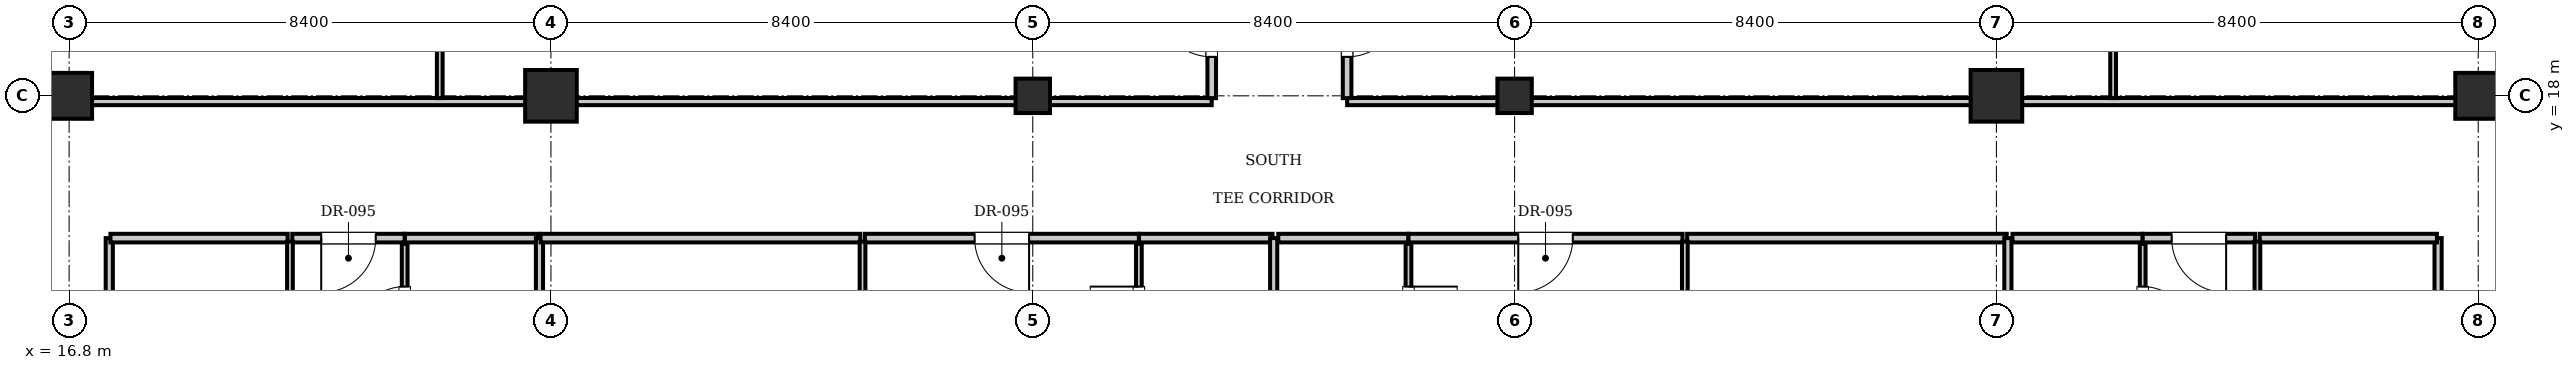
"""IFC4 building model, lengths in metres.
Left out: names, types, materials, properties, quantities, classifications, styles, units other than length and angle.
Written with IfcOpenShell. Run it as: python <this file> out.ifc"""

import sys

from ifc_helpers import new_model, si_unit, direction, frame, frame_2d, origin, origin_2d, place, context, subcontext, project, spatial, rectangle, i_section, extrude, element, fill, save


model = new_model("IFC4")
c1 = context("Model", 3, precision=1e-05, world=origin(), true_north=direction((0.0, 1.0)))
c2 = subcontext(c1, "Body", "Model", "MODEL_VIEW")
j1 = project(units=[si_unit("LENGTHUNIT", "METRE"), si_unit("PLANEANGLEUNIT", "RADIAN")], contexts=[c1])
p1 = place(None, origin())
s1 = spatial("IfcSite", under=j1, at=p1, CompositionType="ELEMENT")
p2 = place(p1, origin())
s2 = spatial("IfcBuilding", under=s1, at=p2, CompositionType="ELEMENT")
p3 = place(p2, frame((0.0, 0.0, 215.95)))
s3 = spatial("IfcBuildingStorey", under=s2, at=p3, CompositionType="ELEMENT", Elevation=215.95)
for number, where, z_axis, x_axis in (
    (1, (25.2, 18.0, 0.0), (0.0, 0.0, 1.0), (1.0, 0.0, 0.0)),
    (2, (50.4, 18.0, 0.0), (0.0, 0.0, 1.0), (1.0, 0.0, 0.0)),
):
    element("IfcColumn", number, at=place(p3, frame(where, z_axis=z_axis, x_axis=x_axis)), inside=s3, PredefinedType="COLUMN", context=c2, shape_type="SweptSolid", body=[
        extrude(rectangle(XDim=0.9, YDim=0.9, at=origin_2d()), origin(), (0.0, 0.0, 1.0), 3.85),
    ])
for number, where, z_axis, x_axis in (
    (3, (33.6, 18.0, 0.0), (0.0, 0.0, 1.0), (1.0, 0.0, 0.0)),
    (4, (42.0, 18.0, 0.0), (0.0, 0.0, 1.0), (1.0, 0.0, 0.0)),
):
    element("IfcColumn", number, at=place(p3, frame(where, z_axis=z_axis, x_axis=x_axis)), inside=s3, PredefinedType="COLUMN", context=c2, shape_type="SweptSolid", body=[
        extrude(i_section(OverallWidth=0.6, OverallDepth=0.6, WebThickness=0.025, FlangeThickness=0.038, at=origin_2d()), origin(), (0.0, 0.0, 1.0), 3.85),
    ])
for number, where, z_axis, x_axis in (
    (5, (16.8, 18.0, 0.0), (0.0, 0.0, 1.0), (1.0, 0.0, 0.0)),
    (6, (58.8, 18.0, 0.0), (0.0, 0.0, 1.0), (1.0, 0.0, 0.0)),
):
    element("IfcColumn", number, at=place(p3, frame(where, z_axis=z_axis, x_axis=x_axis)), inside=s3, PredefinedType="COLUMN", context=c2, shape_type="SweptSolid", body=[
        extrude(rectangle(XDim=0.8, YDim=0.8, at=origin_2d()), origin(), (0.0, 0.0, 1.0), 3.85),
    ])
for number, where, z_axis, x_axis in (
    (7, (17.5, 9.0, 0.0), (0.0, 0.0, 1.0), (0.0, 1.0, 0.0)),
    (8, (58.1, 9.0, 0.0), (0.0, 0.0, 1.0), (0.0, 1.0, 0.0)),
):
    element("IfcWall", number, at=place(p3, frame(where, z_axis=z_axis, x_axis=x_axis)), inside=s3, PredefinedType="PARTITIONING", context=c2, shape_type="SweptSolid", body=[
        extrude(rectangle(XDim=6.52, YDim=0.125, at=frame_2d((3.26, 0.0))), origin(), (0.0, 0.0, 1.0), 3.61),
    ])
p4 = place(p3, frame((22.65, 15.52, 0.0), z_axis=(0.0, 0.0, 1.0), x_axis=(1.0, 0.0, 0.0)))
e9 = element("IfcWall", 9, at=p4, inside=s3, PredefinedType="PARTITIONING", context=c2, shape_type="SweptSolid", body=[
    extrude(rectangle(XDim=2.33, YDim=0.15, at=frame_2d((1.165, 0.0))), origin(), (0.0, 0.0, 1.0), 3.61),
])
p5 = place(p3, frame((22.65, 13.08, 0.0), z_axis=(0.0, 0.0, 1.0), x_axis=(0.0, 1.0, 0.0)))
e10 = element("IfcWall", 10, at=p5, inside=s3, PredefinedType="PARTITIONING", context=c2, shape_type="SweptSolid", body=[
    extrude(rectangle(XDim=2.34, YDim=0.1, at=frame_2d((1.17, 0.0))), origin(), (0.0, 0.0, 1.0), 3.61),
])
p6 = place(p5, frame((0.745, 0.0, 0.0)))
e11 = element("IfcOpeningElement", 11, at=p6, cuts=e10, PredefinedType="OPENING", context=c2, shape_type="SweptSolid", body=[
    extrude(rectangle(XDim=0.85, YDim=2.1, at=frame_2d((0.425, 1.05))), frame((0.0, 0.06, 0.0), z_axis=(0.0, -1.0, 0.0), x_axis=(1.0, 0.0, 0.0)), (0.0, 0.0, 1.0), 0.12),
])
p7 = place(p3, frame((17.52, 15.52, 0.0), z_axis=(0.0, 0.0, 1.0), x_axis=(1.0, 0.0, 0.0)))
e12 = element("IfcWall", 12, at=p7, inside=s3, PredefinedType="PARTITIONING", context=c2, shape_type="SweptSolid", body=[
    extrude(rectangle(XDim=3.09, YDim=0.15, at=frame_2d((1.545, 0.0))), origin(), (0.0, 0.0, 1.0), 3.61),
])
p8 = place(p3, frame((20.69, 15.52, 0.0), z_axis=(0.0, 0.0, 1.0), x_axis=(1.0, 0.0, 0.0)))
e13 = element("IfcWall", 13, at=p8, inside=s3, PredefinedType="PARTITIONING", context=c2, shape_type="SweptSolid", body=[
    extrude(rectangle(XDim=1.96, YDim=0.15, at=frame_2d((0.98, 0.0))), origin(), (0.0, 0.0, 1.0), 3.61),
])
p9 = place(p8, frame((0.505, 0.0, 0.0)))
e14 = element("IfcOpeningElement", 14, at=p9, cuts=e13, PredefinedType="OPENING", context=c2, shape_type="SweptSolid", body=[
    extrude(rectangle(XDim=0.95, YDim=2.15, at=frame_2d((0.475, 1.075))), frame((0.0, 0.085, 0.0), z_axis=(0.0, -1.0, 0.0), x_axis=(1.0, 0.0, 0.0)), (0.0, 0.0, 1.0), 0.17),
])
p10 = place(p3, frame((20.65, 4.63, 0.0), z_axis=(0.0, 0.0, 1.0), x_axis=(0.0, 1.0, 0.0)))
e15 = element("IfcWall", 15, at=p10, inside=s3, PredefinedType="PARTITIONING", context=c2, shape_type="SweptSolid", body=[
    extrude(rectangle(XDim=10.83, YDim=0.1, at=frame_2d((5.415, 0.0))), origin(), (0.0, 0.0, 1.0), 3.61),
])
p11 = place(p10, frame((1.6, 0.0, 0.0)))
e16 = element("IfcOpeningElement", 16, at=p11, cuts=e15, PredefinedType="OPENING", context=c2, shape_type="SweptSolid", body=[
    extrude(rectangle(XDim=0.9, YDim=2.1, at=frame_2d((0.45, 1.05))), frame((0.0, 0.06, 0.0), z_axis=(0.0, -1.0, 0.0), x_axis=(1.0, 0.0, 0.0)), (0.0, 0.0, 1.0), 0.12),
])
p12 = place(p3, frame((25.0, 4.7, 0.0), z_axis=(0.0, 0.0, 1.0), x_axis=(0.0, 1.0, 0.0)))
e17 = element("IfcWall", 17, at=p12, inside=s3, PredefinedType="PARTITIONING", context=c2, shape_type="SweptSolid", body=[
    extrude(rectangle(XDim=10.82, YDim=0.125, at=frame_2d((5.41, 0.0))), origin(), (0.0, 0.0, 1.0), 3.61),
])
p13 = place(p3, frame((35.45, 15.52, 0.0), z_axis=(0.0, 0.0, 1.0), x_axis=(1.0, 0.0, 0.0)))
e18 = element("IfcWall", 18, at=p13, inside=s3, PredefinedType="PARTITIONING", context=c2, shape_type="SweptSolid", body=[
    extrude(rectangle(XDim=2.33, YDim=0.15, at=frame_2d((1.165, 0.0))), origin(), (0.0, 0.0, 1.0), 3.61),
])
p14 = place(p3, frame((35.45, 13.08, 0.0), z_axis=(0.0, 0.0, 1.0), x_axis=(0.0, 1.0, 0.0)))
e19 = element("IfcWall", 19, at=p14, inside=s3, PredefinedType="PARTITIONING", context=c2, shape_type="SweptSolid", body=[
    extrude(rectangle(XDim=2.34, YDim=0.1, at=frame_2d((1.17, 0.0))), origin(), (0.0, 0.0, 1.0), 3.61),
])
p15 = place(p14, frame((0.745, 0.0, 0.0)))
e20 = element("IfcOpeningElement", 20, at=p15, cuts=e19, PredefinedType="OPENING", context=c2, shape_type="SweptSolid", body=[
    extrude(rectangle(XDim=0.85, YDim=2.1, at=frame_2d((0.425, 1.05))), frame((0.0, 0.06, 0.0), z_axis=(0.0, -1.0, 0.0), x_axis=(1.0, 0.0, 0.0)), (0.0, 0.0, 1.0), 0.12),
])
p16 = place(p3, frame((25.02, 15.52, 0.0), z_axis=(0.0, 0.0, 1.0), x_axis=(1.0, 0.0, 0.0)))
e21 = element("IfcWall", 21, at=p16, inside=s3, PredefinedType="PARTITIONING", context=c2, shape_type="SweptSolid", body=[
    extrude(rectangle(XDim=5.572, YDim=0.15, at=frame_2d((2.786, 0.0))), origin(), (0.0, 0.0, 1.0), 3.61),
])
p17 = place(p3, frame((30.672, 15.52, 0.0), z_axis=(0.0, 0.0, 1.0), x_axis=(1.0, 0.0, 0.0)))
e22 = element("IfcWall", 22, at=p17, inside=s3, PredefinedType="PARTITIONING", context=c2, shape_type="SweptSolid", body=[
    extrude(rectangle(XDim=4.778, YDim=0.15, at=frame_2d((2.389, 0.0))), origin(), (0.0, 0.0, 1.0), 3.61),
])
p18 = place(p17, frame((1.914, 0.0, 0.0)))
e23 = element("IfcOpeningElement", 23, at=p18, cuts=e22, PredefinedType="OPENING", context=c2, shape_type="SweptSolid", body=[
    extrude(rectangle(XDim=0.95, YDim=2.15, at=frame_2d((0.475, 1.075))), frame((0.0, 0.085, 0.0), z_axis=(0.0, -1.0, 0.0), x_axis=(1.0, 0.0, 0.0)), (0.0, 0.0, 1.0), 0.17),
])
p19 = place(p3, frame((30.632, 4.63, 0.0), z_axis=(0.0, 0.0, 1.0), x_axis=(0.0, 1.0, 0.0)))
e24 = element("IfcWall", 24, at=p19, inside=s3, PredefinedType="PARTITIONING", context=c2, shape_type="SweptSolid", body=[
    extrude(rectangle(XDim=10.83, YDim=0.1, at=frame_2d((5.415, 0.0))), origin(), (0.0, 0.0, 1.0), 3.61),
])
p20 = place(p19, frame((1.6, 0.0, 0.0)))
e25 = element("IfcOpeningElement", 25, at=p20, cuts=e24, PredefinedType="OPENING", context=c2, shape_type="SweptSolid", body=[
    extrude(rectangle(XDim=0.9, YDim=2.1, at=frame_2d((0.45, 1.05))), frame((0.0, 0.06, 0.0), z_axis=(0.0, -1.0, 0.0), x_axis=(1.0, 0.0, 0.0)), (0.0, 0.0, 1.0), 0.12),
])
p21 = place(p3, frame((37.8, 4.7, 0.0), z_axis=(0.0, 0.0, 1.0), x_axis=(0.0, 1.0, 0.0)))
e26 = element("IfcWall", 26, at=p21, inside=s3, PredefinedType="PARTITIONING", context=c2, shape_type="SweptSolid", body=[
    extrude(rectangle(XDim=10.82, YDim=0.125, at=frame_2d((5.41, 0.0))), origin(), (0.0, 0.0, 1.0), 3.255),
])
p22 = place(p3, frame((37.88, 15.52, 0.0), z_axis=(0.0, 0.0, 1.0), x_axis=(1.0, 0.0, 0.0)))
e27 = element("IfcWall", 27, at=p22, inside=s3, PredefinedType="PARTITIONING", context=c2, shape_type="SweptSolid", body=[
    extrude(rectangle(XDim=2.27, YDim=0.15, at=frame_2d((1.135, 0.0))), origin(), (0.0, 0.0, 1.0), 3.61),
])
p23 = place(p3, frame((40.15, 13.08, 0.0), z_axis=(0.0, 0.0, 1.0), x_axis=(0.0, 1.0, 0.0)))
e28 = element("IfcWall", 28, at=p23, inside=s3, PredefinedType="PARTITIONING", context=c2, shape_type="SweptSolid", body=[
    extrude(rectangle(XDim=2.34, YDim=0.1, at=frame_2d((1.17, 0.0))), origin(), (0.0, 0.0, 1.0), 3.61),
])
p24 = place(p23, frame((0.745, 0.0, 0.0)))
e29 = element("IfcOpeningElement", 29, at=p24, cuts=e28, PredefinedType="OPENING", context=c2, shape_type="SweptSolid", body=[
    extrude(rectangle(XDim=0.85, YDim=2.1, at=frame_2d((0.425, 1.05))), frame((0.0, 0.06, 0.0), z_axis=(0.0, -1.0, 0.0), x_axis=(1.0, 0.0, 0.0)), (0.0, 0.0, 1.0), 0.12),
])
p25 = place(p3, frame((40.15, 15.52, 0.0), z_axis=(0.0, 0.0, 1.0), x_axis=(1.0, 0.0, 0.0)))
e30 = element("IfcWall", 30, at=p25, inside=s3, PredefinedType="PARTITIONING", context=c2, shape_type="SweptSolid", body=[
    extrude(rectangle(XDim=4.778, YDim=0.15, at=frame_2d((2.389, 0.0))), origin(), (0.0, 0.0, 1.0), 3.61),
])
p26 = place(p25, frame((1.914, 0.0, 0.0)))
e31 = element("IfcOpeningElement", 31, at=p26, cuts=e30, PredefinedType="OPENING", context=c2, shape_type="SweptSolid", body=[
    extrude(rectangle(XDim=0.95, YDim=2.15, at=frame_2d((0.475, 1.075))), frame((0.0, 0.085, 0.0), z_axis=(0.0, -1.0, 0.0), x_axis=(1.0, 0.0, 0.0)), (0.0, 0.0, 1.0), 0.17),
])
p27 = place(p3, frame((45.008, 15.52, 0.0), z_axis=(0.0, 0.0, 1.0), x_axis=(1.0, 0.0, 0.0)))
e32 = element("IfcWall", 32, at=p27, inside=s3, PredefinedType="PARTITIONING", context=c2, shape_type="SweptSolid", body=[
    extrude(rectangle(XDim=5.572, YDim=0.15, at=frame_2d((2.786, 0.0))), origin(), (0.0, 0.0, 1.0), 3.61),
])
p28 = place(p3, frame((44.968, 4.63, 0.0), z_axis=(0.0, 0.0, 1.0), x_axis=(0.0, 1.0, 0.0)))
e33 = element("IfcWall", 33, at=p28, inside=s3, PredefinedType="PARTITIONING", context=c2, shape_type="SweptSolid", body=[
    extrude(rectangle(XDim=10.83, YDim=0.1, at=frame_2d((5.415, 0.0))), origin(), (0.0, 0.0, 1.0), 3.61),
])
p29 = place(p28, frame((1.6, 0.0, 0.0)))
e34 = element("IfcOpeningElement", 34, at=p29, cuts=e33, PredefinedType="OPENING", context=c2, shape_type="SweptSolid", body=[
    extrude(rectangle(XDim=0.9, YDim=2.1, at=frame_2d((0.45, 1.05))), frame((0.0, 0.06, 0.0), z_axis=(0.0, -1.0, 0.0), x_axis=(1.0, 0.0, 0.0)), (0.0, 0.0, 1.0), 0.12),
])
p30 = place(p3, frame((50.6, 4.7, 0.0), z_axis=(0.0, 0.0, 1.0), x_axis=(0.0, 1.0, 0.0)))
e35 = element("IfcWall", 35, at=p30, inside=s3, PredefinedType="PARTITIONING", context=c2, shape_type="SweptSolid", body=[
    extrude(rectangle(XDim=10.82, YDim=0.125, at=frame_2d((5.41, 0.0))), origin(), (0.0, 0.0, 1.0), 3.61),
])
p31 = place(p3, frame((50.68, 15.52, 0.0), z_axis=(0.0, 0.0, 1.0), x_axis=(1.0, 0.0, 0.0)))
e36 = element("IfcWall", 36, at=p31, inside=s3, PredefinedType="PARTITIONING", context=c2, shape_type="SweptSolid", body=[
    extrude(rectangle(XDim=2.27, YDim=0.15, at=frame_2d((1.135, 0.0))), origin(), (0.0, 0.0, 1.0), 3.61),
])
p32 = place(p3, frame((52.95, 13.08, 0.0), z_axis=(0.0, 0.0, 1.0), x_axis=(0.0, 1.0, 0.0)))
e37 = element("IfcWall", 37, at=p32, inside=s3, PredefinedType="PARTITIONING", context=c2, shape_type="SweptSolid", body=[
    extrude(rectangle(XDim=2.34, YDim=0.1, at=frame_2d((1.17, 0.0))), origin(), (0.0, 0.0, 1.0), 3.61),
])
p33 = place(p32, frame((0.745, 0.0, 0.0)))
e38 = element("IfcOpeningElement", 38, at=p33, cuts=e37, PredefinedType="OPENING", context=c2, shape_type="SweptSolid", body=[
    extrude(rectangle(XDim=0.85, YDim=2.1, at=frame_2d((0.425, 1.05))), frame((0.0, 0.06, 0.0), z_axis=(0.0, -1.0, 0.0), x_axis=(1.0, 0.0, 0.0)), (0.0, 0.0, 1.0), 0.12),
])
p34 = place(p3, frame((52.95, 15.52, 0.0), z_axis=(0.0, 0.0, 1.0), x_axis=(1.0, 0.0, 0.0)))
e39 = element("IfcWall", 39, at=p34, inside=s3, PredefinedType="PARTITIONING", context=c2, shape_type="SweptSolid", body=[
    extrude(rectangle(XDim=1.96, YDim=0.15, at=frame_2d((0.98, 0.0))), origin(), (0.0, 0.0, 1.0), 3.61),
])
p35 = place(p34, frame((0.505, 0.0, 0.0)))
e40 = element("IfcOpeningElement", 40, at=p35, cuts=e39, PredefinedType="OPENING", context=c2, shape_type="SweptSolid", body=[
    extrude(rectangle(XDim=0.95, YDim=2.15, at=frame_2d((0.475, 1.075))), frame((0.0, 0.085, 0.0), z_axis=(0.0, -1.0, 0.0), x_axis=(1.0, 0.0, 0.0)), (0.0, 0.0, 1.0), 0.17),
])
p36 = place(p3, frame((54.99, 15.52, 0.0), z_axis=(0.0, 0.0, 1.0), x_axis=(1.0, 0.0, 0.0)))
e41 = element("IfcWall", 41, at=p36, inside=s3, PredefinedType="PARTITIONING", context=c2, shape_type="SweptSolid", body=[
    extrude(rectangle(XDim=3.09, YDim=0.15, at=frame_2d((1.545, 0.0))), origin(), (0.0, 0.0, 1.0), 3.61),
])
p37 = place(p3, frame((54.95, 4.63, 0.0), z_axis=(0.0, 0.0, 1.0), x_axis=(0.0, 1.0, 0.0)))
e42 = element("IfcWall", 42, at=p37, inside=s3, PredefinedType="PARTITIONING", context=c2, shape_type="SweptSolid", body=[
    extrude(rectangle(XDim=10.83, YDim=0.1, at=frame_2d((5.415, 0.0))), origin(), (0.0, 0.0, 1.0), 3.61),
])
p38 = place(p37, frame((1.6, 0.0, 0.0)))
e43 = element("IfcOpeningElement", 43, at=p38, cuts=e42, PredefinedType="OPENING", context=c2, shape_type="SweptSolid", body=[
    extrude(rectangle(XDim=0.9, YDim=2.1, at=frame_2d((0.45, 1.05))), frame((0.0, 0.06, 0.0), z_axis=(0.0, -1.0, 0.0), x_axis=(1.0, 0.0, 0.0)), (0.0, 0.0, 1.0), 0.12),
])
p39 = place(p3, frame((13.2, 17.9, 0.0), z_axis=(0.0, 0.0, 1.0), x_axis=(1.0, 0.0, 0.0)))
e44 = element("IfcWall", 44, at=p39, inside=s3, PredefinedType="PARTITIONING", context=c2, shape_type="SweptSolid", body=[
    extrude(rectangle(XDim=23.52, YDim=0.125, at=frame_2d((11.76, 0.0))), origin(), (0.0, 0.0, 1.0), 3.071),
])
p40 = place(p3, frame((39.08, 17.9, 0.0), z_axis=(0.0, 0.0, 1.0), x_axis=(1.0, 0.0, 0.0)))
e45 = element("IfcWall", 45, at=p40, inside=s3, PredefinedType="PARTITIONING", context=c2, shape_type="SweptSolid", body=[
    extrude(rectangle(XDim=23.32, YDim=0.125, at=frame_2d((11.66, 0.0))), origin(), (0.0, 0.0, 1.0), 3.071),
])
p41 = place(p3, frame((36.72, 17.96, 0.0), z_axis=(0.0, 0.0, 1.0), x_axis=(0.0, 1.0, 0.0)))
e46 = element("IfcWall", 46, at=p41, inside=s3, PredefinedType="PARTITIONING", context=c2, shape_type="SweptSolid", body=[
    extrude(rectangle(XDim=2.39, YDim=0.15, at=frame_2d((1.195, 0.0))), origin(), (0.0, 0.0, 1.0), 3.61),
])
p42 = place(p41, frame((0.72, 0.0, 0.0)))
e47 = element("IfcOpeningElement", 47, at=p42, cuts=e46, PredefinedType="OPENING", context=c2, shape_type="SweptSolid", body=[
    extrude(rectangle(XDim=0.95, YDim=2.15, at=frame_2d((0.475, 1.075))), frame((0.0, 0.085, 0.0), z_axis=(0.0, -1.0, 0.0), x_axis=(1.0, 0.0, 0.0)), (0.0, 0.0, 1.0), 0.17),
])
p43 = place(p3, frame((23.262, 17.96, 0.0), z_axis=(0.0, 0.0, 1.0), x_axis=(0.0, 1.0, 0.0)))
e48 = element("IfcWall", 48, at=p43, inside=s3, PredefinedType="PARTITIONING", context=c2, shape_type="SweptSolid", body=[
    extrude(rectangle(XDim=4.28, YDim=0.1, at=frame_2d((2.14, 0.0))), origin(), (0.0, 0.0, 1.0), 3.61),
])
p44 = place(p43, frame((1.69, 0.0, 0.0)))
e49 = element("IfcOpeningElement", 49, at=p44, cuts=e48, PredefinedType="OPENING", context=c2, shape_type="SweptSolid", body=[
    extrude(rectangle(XDim=0.9, YDim=2.1, at=frame_2d((0.45, 1.05))), frame((0.0, 0.06, 0.0), z_axis=(0.0, -1.0, 0.0), x_axis=(1.0, 0.0, 0.0)), (0.0, 0.0, 1.0), 0.12),
])
p45 = place(p3, frame((39.08, 17.96, 0.0), z_axis=(0.0, 0.0, 1.0), x_axis=(0.0, 1.0, 0.0)))
e50 = element("IfcWall", 50, at=p45, inside=s3, PredefinedType="PARTITIONING", context=c2, shape_type="SweptSolid", body=[
    extrude(rectangle(XDim=2.39, YDim=0.15, at=frame_2d((1.195, 0.0))), origin(), (0.0, 0.0, 1.0), 3.61),
])
p46 = place(p45, frame((0.72, 0.0, 0.0)))
e51 = element("IfcOpeningElement", 51, at=p46, cuts=e50, PredefinedType="OPENING", context=c2, shape_type="SweptSolid", body=[
    extrude(rectangle(XDim=0.95, YDim=2.15, at=frame_2d((0.475, 1.075))), frame((0.0, 0.085, 0.0), z_axis=(0.0, -1.0, 0.0), x_axis=(1.0, 0.0, 0.0)), (0.0, 0.0, 1.0), 0.17),
])
p47 = place(p3, frame((52.434, 17.96, 0.0), z_axis=(0.0, 0.0, 1.0), x_axis=(0.0, 1.0, 0.0)))
e52 = element("IfcWall", 52, at=p47, inside=s3, PredefinedType="PARTITIONING", context=c2, shape_type="SweptSolid", body=[
    extrude(rectangle(XDim=4.28, YDim=0.1, at=frame_2d((2.14, 0.0))), origin(), (0.0, 0.0, 1.0), 3.61),
])
p48 = place(p47, frame((1.69, 0.0, 0.0)))
e53 = element("IfcOpeningElement", 53, at=p48, cuts=e52, PredefinedType="OPENING", context=c2, shape_type="SweptSolid", body=[
    extrude(rectangle(XDim=0.9, YDim=2.1, at=frame_2d((0.45, 1.05))), frame((0.0, 0.06, 0.0), z_axis=(0.0, -1.0, 0.0), x_axis=(1.0, 0.0, 0.0)), (0.0, 0.0, 1.0), 0.12),
])
p49 = place(p6, origin())
e54 = element("IfcDoor", 54, at=p49, inside=s3, OperationType="SINGLE_SWING_LEFT", PredefinedType="DOOR", context=c2, shape_type="SweptSolid", body=[
    extrude(rectangle(XDim=0.85, YDim=2.1, at=frame_2d((0.425, 1.05))), frame((0.0, 0.025, 0.0), z_axis=(0.0, -1.0, 0.0), x_axis=(1.0, 0.0, 0.0)), (0.0, 0.0, 1.0), 0.05),
])
fill(e11, e54)
p50 = place(p9, frame((0.95, 0.0, 0.0), z_axis=(0.0, 0.0, 1.0), x_axis=(-1.0, 0.0, 0.0)))
e55 = element("IfcDoor", 55, at=p50, inside=s3, OperationType="SINGLE_SWING_RIGHT", PredefinedType="DOOR", context=c2, shape_type="SweptSolid", body=[
    extrude(rectangle(XDim=0.95, YDim=2.15, at=frame_2d((0.475, 1.075))), frame((0.0, 0.025, 0.0), z_axis=(0.0, -1.0, 0.0), x_axis=(1.0, 0.0, 0.0)), (0.0, 0.0, 1.0), 0.05),
])
fill(e14, e55)
p51 = place(p15, origin())
e56 = element("IfcDoor", 56, at=p51, inside=s3, OperationType="SINGLE_SWING_RIGHT", PredefinedType="DOOR", context=c2, shape_type="SweptSolid", body=[
    extrude(rectangle(XDim=0.85, YDim=2.1, at=frame_2d((0.425, 1.05))), frame((0.0, 0.025, 0.0), z_axis=(0.0, -1.0, 0.0), x_axis=(1.0, 0.0, 0.0)), (0.0, 0.0, 1.0), 0.05),
])
fill(e20, e56)
p52 = place(p18, frame((0.95, 0.0, 0.0), z_axis=(0.0, 0.0, 1.0), x_axis=(-1.0, 0.0, 0.0)))
e57 = element("IfcDoor", 57, at=p52, inside=s3, OperationType="SINGLE_SWING_LEFT", PredefinedType="DOOR", context=c2, shape_type="SweptSolid", body=[
    extrude(rectangle(XDim=0.95, YDim=2.15, at=frame_2d((0.475, 1.075))), frame((0.0, 0.025, 0.0), z_axis=(0.0, -1.0, 0.0), x_axis=(1.0, 0.0, 0.0)), (0.0, 0.0, 1.0), 0.05),
])
fill(e23, e57)
p53 = place(p24, frame((0.85, 0.0, 0.0), z_axis=(0.0, 0.0, 1.0), x_axis=(-1.0, 0.0, 0.0)))
e58 = element("IfcDoor", 58, at=p53, inside=s3, OperationType="SINGLE_SWING_LEFT", PredefinedType="DOOR", context=c2, shape_type="SweptSolid", body=[
    extrude(rectangle(XDim=0.85, YDim=2.1, at=frame_2d((0.425, 1.05))), frame((0.0, 0.025, 0.0), z_axis=(0.0, -1.0, 0.0), x_axis=(1.0, 0.0, 0.0)), (0.0, 0.0, 1.0), 0.05),
])
fill(e29, e58)
p54 = place(p26, frame((0.95, 0.0, 0.0), z_axis=(0.0, 0.0, 1.0), x_axis=(-1.0, 0.0, 0.0)))
e59 = element("IfcDoor", 59, at=p54, inside=s3, OperationType="SINGLE_SWING_RIGHT", PredefinedType="DOOR", context=c2, shape_type="SweptSolid", body=[
    extrude(rectangle(XDim=0.95, YDim=2.15, at=frame_2d((0.475, 1.075))), frame((0.0, 0.025, 0.0), z_axis=(0.0, -1.0, 0.0), x_axis=(1.0, 0.0, 0.0)), (0.0, 0.0, 1.0), 0.05),
])
fill(e31, e59)
p55 = place(p33, frame((0.85, 0.0, 0.0), z_axis=(0.0, 0.0, 1.0), x_axis=(-1.0, 0.0, 0.0)))
e60 = element("IfcDoor", 60, at=p55, inside=s3, OperationType="SINGLE_SWING_RIGHT", PredefinedType="DOOR", context=c2, shape_type="SweptSolid", body=[
    extrude(rectangle(XDim=0.85, YDim=2.1, at=frame_2d((0.425, 1.05))), frame((0.0, 0.025, 0.0), z_axis=(0.0, -1.0, 0.0), x_axis=(1.0, 0.0, 0.0)), (0.0, 0.0, 1.0), 0.05),
])
fill(e38, e60)
p56 = place(p35, frame((0.95, 0.0, 0.0), z_axis=(0.0, 0.0, 1.0), x_axis=(-1.0, 0.0, 0.0)))
e61 = element("IfcDoor", 61, at=p56, inside=s3, OperationType="SINGLE_SWING_LEFT", PredefinedType="DOOR", context=c2, shape_type="SweptSolid", body=[
    extrude(rectangle(XDim=0.95, YDim=2.15, at=frame_2d((0.475, 1.075))), frame((0.0, 0.025, 0.0), z_axis=(0.0, -1.0, 0.0), x_axis=(1.0, 0.0, 0.0)), (0.0, 0.0, 1.0), 0.05),
])
fill(e40, e61)
p57 = place(p42, origin())
e62 = element("IfcDoor", 62, at=p57, inside=s3, OperationType="SINGLE_SWING_RIGHT", PredefinedType="DOOR", context=c2, shape_type="SweptSolid", body=[
    extrude(rectangle(XDim=0.95, YDim=2.15, at=frame_2d((0.475, 1.075))), frame((0.0, 0.025, 0.0), z_axis=(0.0, -1.0, 0.0), x_axis=(1.0, 0.0, 0.0)), (0.0, 0.0, 1.0), 0.05),
])
fill(e47, e62)
p58 = place(p46, frame((0.95, 0.0, 0.0), z_axis=(0.0, 0.0, 1.0), x_axis=(-1.0, 0.0, 0.0)))
e63 = element("IfcDoor", 63, at=p58, inside=s3, OperationType="SINGLE_SWING_LEFT", PredefinedType="DOOR", context=c2, shape_type="SweptSolid", body=[
    extrude(rectangle(XDim=0.95, YDim=2.15, at=frame_2d((0.475, 1.075))), frame((0.0, 0.025, 0.0), z_axis=(0.0, -1.0, 0.0), x_axis=(1.0, 0.0, 0.0)), (0.0, 0.0, 1.0), 0.05),
])
fill(e51, e63)
save(model, sys.argv[1])
